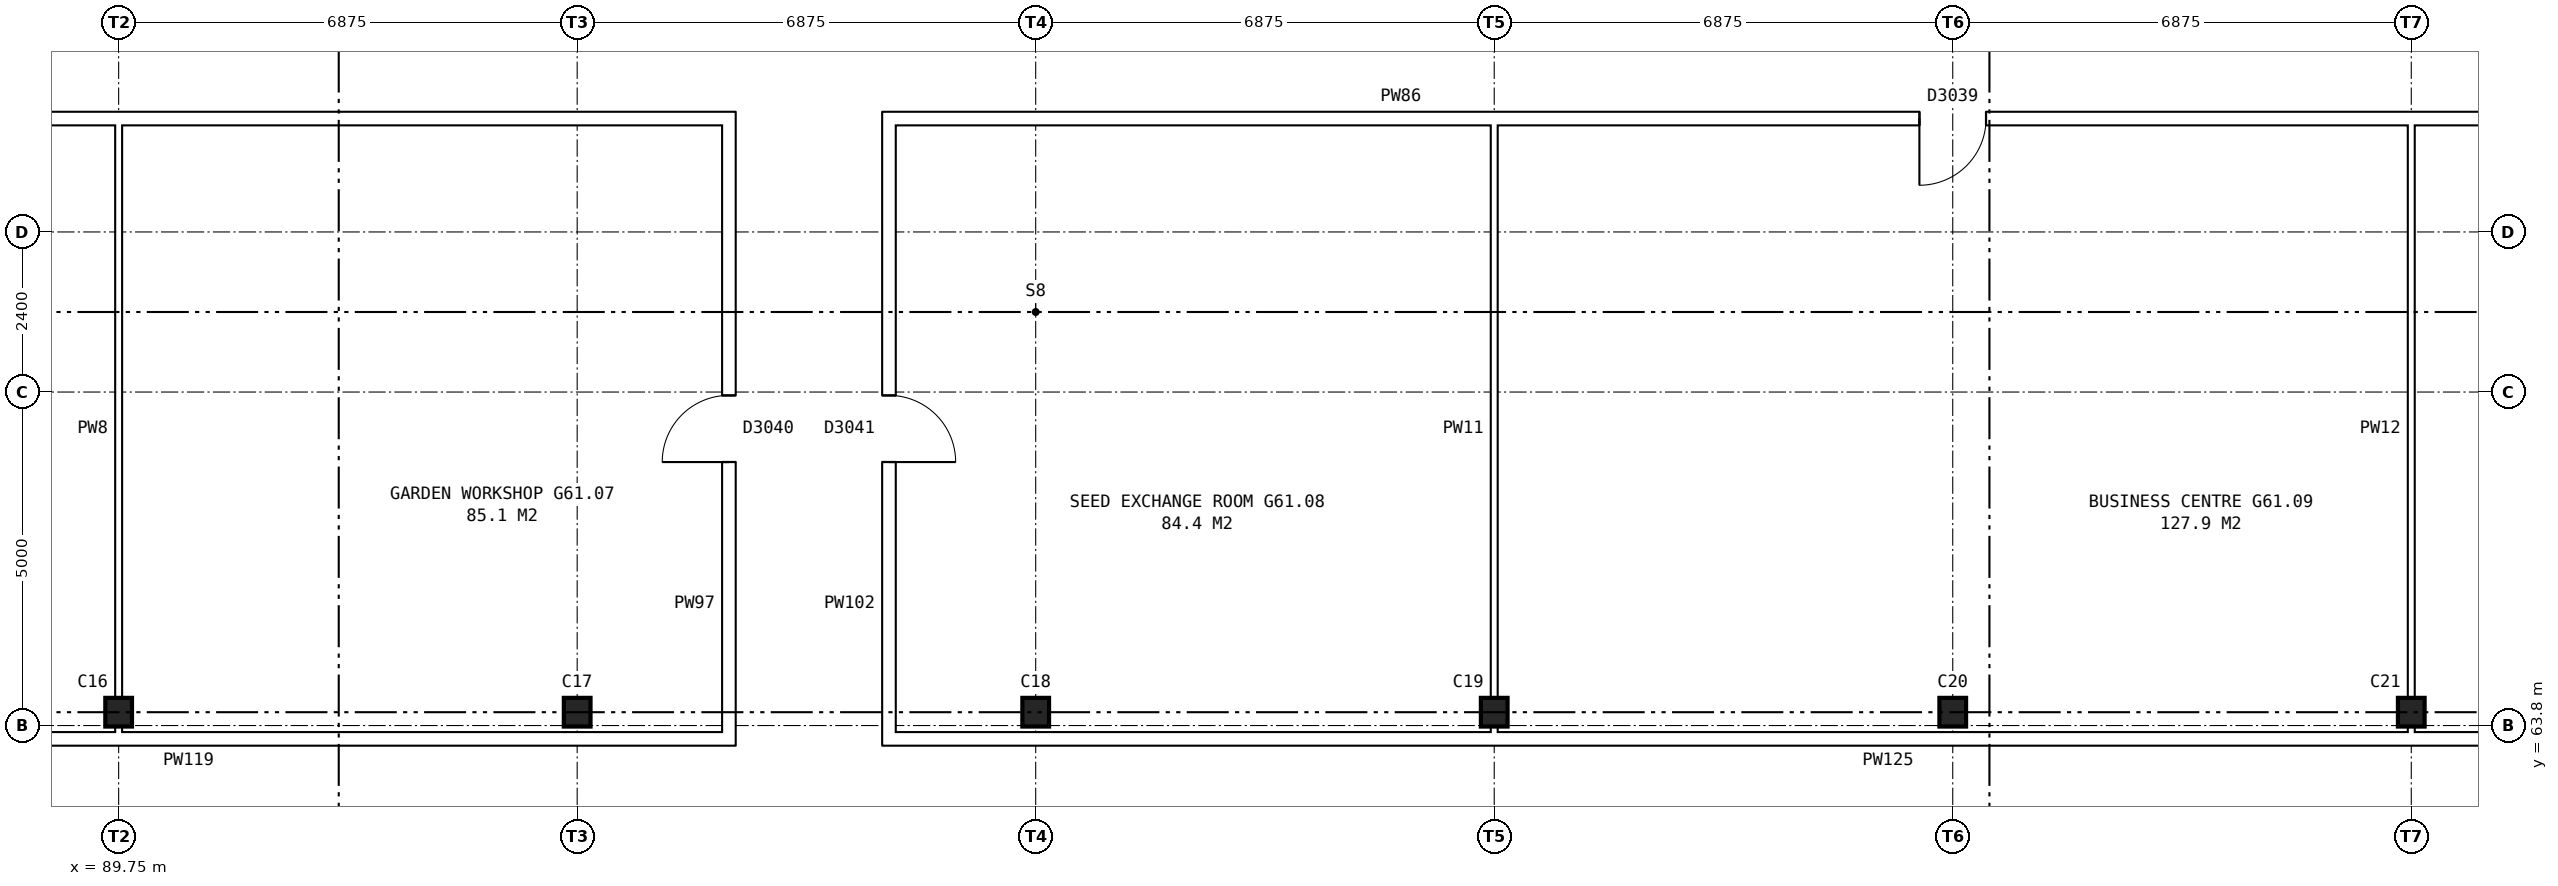
"""IFC4 building model, lengths in metres.
Left out: names, types, materials, properties, quantities, classifications, styles, units other than length and angle.
Written with IfcOpenShell. Run it as: python <this file> out.ifc"""

import sys

from ifc_helpers import new_model, si_unit, direction, frame, frame_2d, origin, origin_2d, place, context, subcontext, project, spatial, rectangle, i_section, extrude, element, fill, save


model = new_model("IFC4")
c1 = context("Model", 3, precision=1e-05, world=origin(), true_north=direction((0.0, 1.0)))
c2 = subcontext(c1, "Body", "Model", "MODEL_VIEW")
j1 = project(units=[si_unit("LENGTHUNIT", "METRE"), si_unit("PLANEANGLEUNIT", "RADIAN")], contexts=[c1])
p1 = place(None, origin())
s1 = spatial("IfcSite", under=j1, at=p1, CompositionType="ELEMENT")
p2 = place(p1, origin())
s2 = spatial("IfcBuilding", under=s1, at=p2, CompositionType="ELEMENT")
p3 = place(p2, frame((0.0, 0.0, 215.2)))
s3 = spatial("IfcBuildingStorey", under=s2, at=p3, CompositionType="ELEMENT", Elevation=215.2)
for number, where, z_axis, x_axis in (
    (1, (89.75, 64.0, 0.0), (0.0, 0.0, 1.0), (1.0, 0.0, 0.0)),
    (2, (96.625, 64.0, 0.0), (0.0, 0.0, 1.0), (1.0, 0.0, 0.0)),
    (3, (103.5, 64.0, 0.0), (0.0, 0.0, 1.0), (1.0, 0.0, 0.0)),
    (4, (110.375, 64.0, 0.0), (0.0, 0.0, 1.0), (1.0, 0.0, 0.0)),
    (5, (117.25, 64.0, 0.0), (0.0, 0.0, 1.0), (1.0, 0.0, 0.0)),
    (6, (124.125, 64.0, 0.0), (0.0, 0.0, 1.0), (1.0, 0.0, 0.0)),
):
    element("IfcColumn", number, at=place(p3, frame(where, z_axis=z_axis, x_axis=x_axis)), inside=s3, PredefinedType="COLUMN", context=c2, shape_type="SweptSolid", body=[
        extrude(i_section(OverallWidth=0.4, OverallDepth=0.43, WebThickness=0.04, FlangeThickness=0.04, at=origin_2d()), origin(), (0.0, 0.0, 1.0), 5.6),
    ])
p4 = place(p3, frame((75.64, 63.6, 0.0), z_axis=(0.0, 0.0, 1.0), x_axis=(1.0, 0.0, 0.0)))
e7 = element("IfcWall", 7, at=p4, inside=s3, PredefinedType="PARTITIONING", context=c2, shape_type="SweptSolid", body=[
    extrude(rectangle(XDim=23.36, YDim=0.2, at=frame_2d((11.68, 0.0))), origin(), (0.0, 0.0, 1.0), 5.6),
])
p5 = place(p4, frame((5.955, 0.0, 0.0)))
e8 = element("IfcOpeningElement", 8, at=p5, cuts=e7, PredefinedType="OPENING", context=c2, shape_type="SweptSolid", body=[
    extrude(rectangle(XDim=1.0, YDim=2.1, at=frame_2d((0.5, 1.05))), frame((0.0, 0.11, 0.0), z_axis=(0.0, -1.0, 0.0), x_axis=(1.0, 0.0, 0.0)), (0.0, 0.0, 1.0), 0.22),
])
p6 = place(p3, frame((101.2, 63.6, 0.0), z_axis=(0.0, 0.0, 1.0), x_axis=(1.0, 0.0, 0.0)))
e9 = element("IfcWall", 9, at=p6, inside=s3, PredefinedType="PARTITIONING", context=c2, shape_type="SweptSolid", body=[
    extrude(rectangle(XDim=30.16, YDim=0.2, at=frame_2d((15.08, 0.0))), origin(), (0.0, 0.0, 1.0), 5.6),
])
p7 = place(p3, frame((75.64, 72.9, 0.0), z_axis=(0.0, 0.0, 1.0), x_axis=(1.0, 0.0, 0.0)))
e10 = element("IfcWall", 10, at=p7, inside=s3, PredefinedType="PARTITIONING", context=c2, shape_type="SweptSolid", body=[
    extrude(rectangle(XDim=23.36, YDim=0.2, at=frame_2d((11.68, 0.0))), origin(), (0.0, 0.0, 1.0), 5.6),
])
p8 = place(p3, frame((101.2, 72.9, 0.0), z_axis=(0.0, 0.0, 1.0), x_axis=(1.0, 0.0, 0.0)))
e11 = element("IfcWall", 11, at=p8, inside=s3, PredefinedType="PARTITIONING", context=c2, shape_type="SweptSolid", body=[
    extrude(rectangle(XDim=30.16, YDim=0.2, at=frame_2d((15.08, 0.0))), origin(), (0.0, 0.0, 1.0), 5.6),
])
p9 = place(p8, frame((15.55, 0.0, 0.0)))
e12 = element("IfcOpeningElement", 12, at=p9, cuts=e11, PredefinedType="OPENING", context=c2, shape_type="SweptSolid", body=[
    extrude(rectangle(XDim=1.0, YDim=2.1, at=frame_2d((0.5, 1.05))), frame((0.0, 0.11, 0.0), z_axis=(0.0, -1.0, 0.0), x_axis=(1.0, 0.0, 0.0)), (0.0, 0.0, 1.0), 0.22),
])
p10 = place(p8, frame((25.643, 0.0, 0.0)))
e13 = element("IfcOpeningElement", 13, at=p10, cuts=e11, PredefinedType="OPENING", context=c2, shape_type="SweptSolid", body=[
    extrude(rectangle(XDim=1.8, YDim=2.1, at=frame_2d((0.9, 1.05))), frame((0.0, 0.11, 0.0), z_axis=(0.0, -1.0, 0.0), x_axis=(1.0, 0.0, 0.0)), (0.0, 0.0, 1.0), 0.22),
])
p11 = place(p3, frame((89.75, 63.5, 0.0), z_axis=(0.0, 0.0, 1.0), x_axis=(0.0, 1.0, 0.0)))
e14 = element("IfcWall", 14, at=p11, inside=s3, PredefinedType="PARTITIONING", context=c2, shape_type="SweptSolid", body=[
    extrude(rectangle(XDim=9.5, YDim=0.1, at=frame_2d((4.75, 0.0))), origin(), (0.0, 0.0, 1.0), 4.988),
])
p12 = place(p3, frame((98.9, 63.5, 0.0), z_axis=(0.0, 0.0, 1.0), x_axis=(0.0, 1.0, 0.0)))
e15 = element("IfcWall", 15, at=p12, inside=s3, PredefinedType="PARTITIONING", context=c2, shape_type="SweptSolid", body=[
    extrude(rectangle(XDim=9.5, YDim=0.2, at=frame_2d((4.75, 0.0))), origin(), (0.0, 0.0, 1.0), 5.6),
])
p13 = place(p12, frame((4.25, 0.0, 0.0)))
e16 = element("IfcOpeningElement", 16, at=p13, cuts=e15, PredefinedType="OPENING", context=c2, shape_type="SweptSolid", body=[
    extrude(rectangle(XDim=1.0, YDim=2.1, at=frame_2d((0.5, 1.05))), frame((0.0, 0.11, 0.0), z_axis=(0.0, -1.0, 0.0), x_axis=(1.0, 0.0, 0.0)), (0.0, 0.0, 1.0), 0.22),
])
p14 = place(p3, frame((101.3, 63.5, 0.0), z_axis=(0.0, 0.0, 1.0), x_axis=(0.0, 1.0, 0.0)))
e17 = element("IfcWall", 17, at=p14, inside=s3, PredefinedType="PARTITIONING", context=c2, shape_type="SweptSolid", body=[
    extrude(rectangle(XDim=9.5, YDim=0.2, at=frame_2d((4.75, 0.0))), origin(), (0.0, 0.0, 1.0), 5.6),
])
p15 = place(p14, frame((4.25, 0.0, 0.0)))
e18 = element("IfcOpeningElement", 18, at=p15, cuts=e17, PredefinedType="OPENING", context=c2, shape_type="SweptSolid", body=[
    extrude(rectangle(XDim=1.0, YDim=2.1, at=frame_2d((0.5, 1.05))), frame((0.0, 0.11, 0.0), z_axis=(0.0, -1.0, 0.0), x_axis=(1.0, 0.0, 0.0)), (0.0, 0.0, 1.0), 0.22),
])
for number, where, z_axis, x_axis in (
    (19, (110.375, 63.5, 0.0), (0.0, 0.0, 1.0), (0.0, 1.0, 0.0)),
    (20, (124.125, 63.5, 0.0), (0.0, 0.0, 1.0), (0.0, 1.0, 0.0)),
):
    element("IfcWall", number, at=place(p3, frame(where, z_axis=z_axis, x_axis=x_axis)), inside=s3, PredefinedType="PARTITIONING", context=c2, shape_type="SweptSolid", body=[
        extrude(rectangle(XDim=9.5, YDim=0.1, at=frame_2d((4.75, 0.0))), origin(), (0.0, 0.0, 1.0), 4.988),
    ])
p16 = place(p9, frame((1.0, 0.0, 0.0), z_axis=(0.0, 0.0, 1.0), x_axis=(-1.0, 0.0, 0.0)))
e21 = element("IfcDoor", 21, at=p16, inside=s3, OperationType="SINGLE_SWING_RIGHT", PredefinedType="DOOR", context=c2, shape_type="SweptSolid", body=[
    extrude(rectangle(XDim=1.0, YDim=2.1, at=frame_2d((0.5, 1.05))), frame((0.0, 0.025, 0.0), z_axis=(0.0, -1.0, 0.0), x_axis=(1.0, 0.0, 0.0)), (0.0, 0.0, 1.0), 0.05),
])
fill(e12, e21)
p17 = place(p13, origin())
e22 = element("IfcDoor", 22, at=p17, inside=s3, OperationType="SINGLE_SWING_LEFT", PredefinedType="DOOR", context=c2, shape_type="SweptSolid", body=[
    extrude(rectangle(XDim=1.0, YDim=2.1, at=frame_2d((0.5, 1.05))), frame((0.0, 0.025, 0.0), z_axis=(0.0, -1.0, 0.0), x_axis=(1.0, 0.0, 0.0)), (0.0, 0.0, 1.0), 0.05),
])
fill(e16, e22)
p18 = place(p15, frame((1.0, 0.0, 0.0), z_axis=(0.0, 0.0, 1.0), x_axis=(-1.0, 0.0, 0.0)))
e23 = element("IfcDoor", 23, at=p18, inside=s3, OperationType="SINGLE_SWING_RIGHT", PredefinedType="DOOR", context=c2, shape_type="SweptSolid", body=[
    extrude(rectangle(XDim=1.0, YDim=2.1, at=frame_2d((0.5, 1.05))), frame((0.0, 0.025, 0.0), z_axis=(0.0, -1.0, 0.0), x_axis=(1.0, 0.0, 0.0)), (0.0, 0.0, 1.0), 0.05),
])
fill(e18, e23)
save(model, sys.argv[1])
